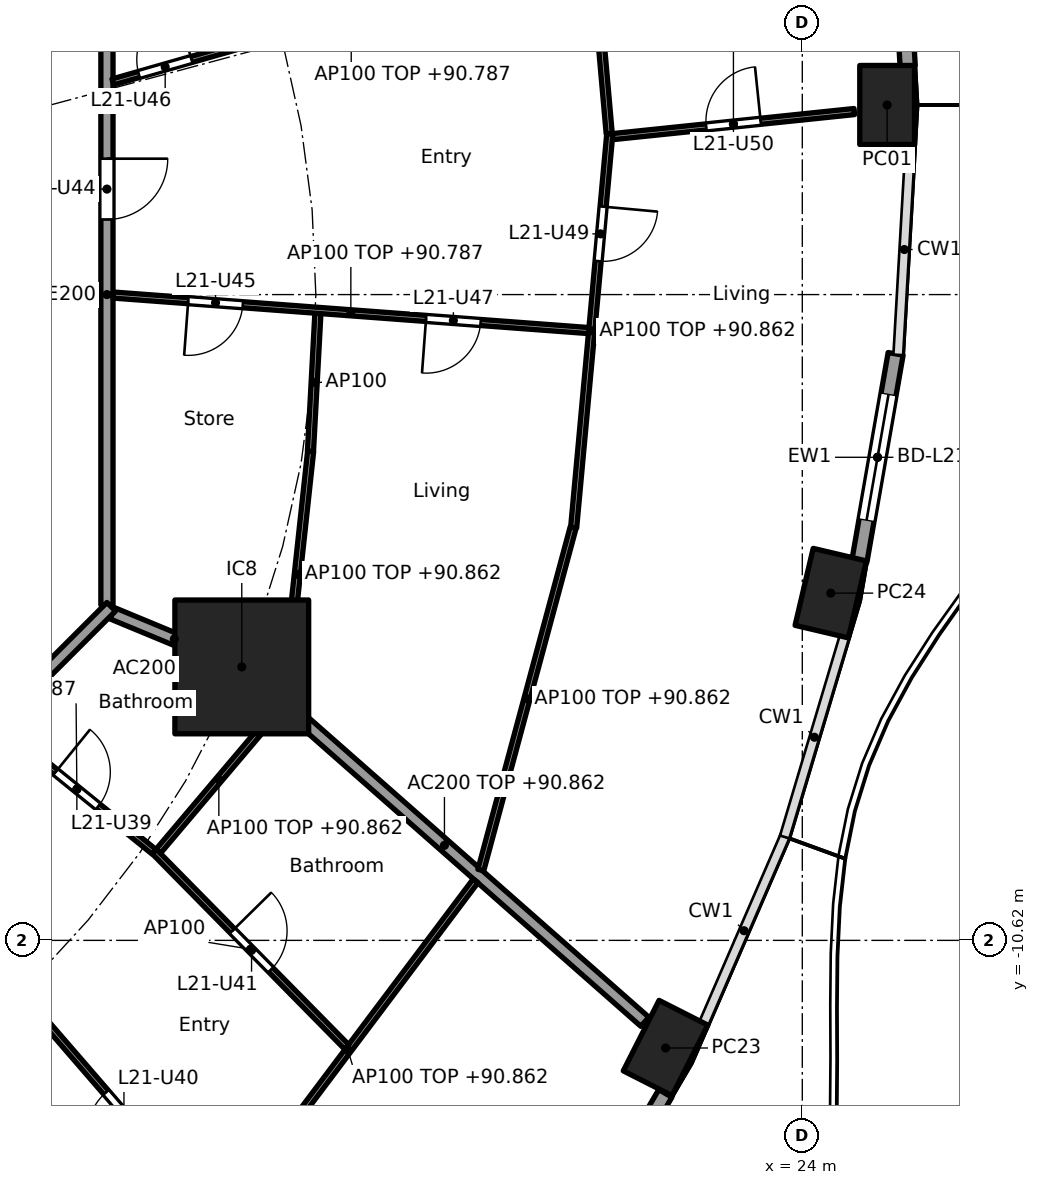
"""IFC4 building model, lengths in metres.
Left out: names, types, materials, properties, quantities, classifications, styles, units other than length and angle.
Written with IfcOpenShell. Run it as: python <this file> out.ifc"""

import sys

from ifc_helpers import new_model, si_unit, direction, frame, frame_2d, origin, origin_2d, place, context, subcontext, project, spatial, rectangle, hollow_rectangle, extrude, element, fill, save


model = new_model("IFC4")
c1 = context("Model", 3, precision=1e-05, world=origin(), true_north=direction((0.0, 1.0)))
c2 = subcontext(c1, "Body", "Model", "MODEL_VIEW")
j1 = project(units=[si_unit("LENGTHUNIT", "METRE"), si_unit("PLANEANGLEUNIT", "RADIAN")], contexts=[c1])
p1 = place(None, origin())
s1 = spatial("IfcSite", under=j1, at=p1, CompositionType="ELEMENT")
p2 = place(p1, origin())
s2 = spatial("IfcBuilding", under=s1, at=p2, CompositionType="ELEMENT")
p3 = place(p2, frame((0.0, 0.0, 88.1)))
s3 = spatial("IfcBuildingStorey", under=s2, at=p3, CompositionType="ELEMENT", Elevation=88.1)
for number, where, z_axis, x_axis in (
    (1, (25.395, 3.118, 0.0), (0.0, 0.0, 1.0), (0.0, 1.0, 0.0)),
    (2, (21.751, -12.39, 0.0), (0.0, 0.0, 1.0), (0.452, 0.892, 0.0)),
    (3, (24.468, -4.91, 0.0), (0.0, 0.0, 1.0), (0.229, 0.973, 0.0)),
):
    element("IfcColumn", number, at=place(p3, frame(where, z_axis=z_axis, x_axis=x_axis)), inside=s3, PredefinedType="COLUMN", context=c2, shape_type="SweptSolid", body=[
        extrude(hollow_rectangle(XDim=1.3, YDim=0.9, WallThickness=0.045, at=origin_2d()), origin(), (0.0, 0.0, 1.0), 3.7),
    ])
p4 = place(p3, frame((14.782, -6.123, 0.0), z_axis=(0.0, 0.0, 1.0), x_axis=(1.0, 0.0, 0.0)))
e4 = element("IfcColumn", 4, at=p4, inside=s3, PredefinedType="COLUMN", context=c2, shape_type="SweptSolid", body=[
    extrude(rectangle(XDim=2.2, YDim=2.2, at=origin_2d()), origin(), (0.0, 0.0, 1.0), 3.7),
])
p5 = place(p3, frame((25.533, 7.224, 0.0), z_axis=(0.0, 0.0, 1.0), x_axis=(0.057546644052, -0.998342818754, 0.0)))
e5 = element("IfcWall", 5, at=p5, inside=s3, PredefinedType="SOLIDWALL", context=c2, shape_type="SweptSolid", body=[
    extrude(rectangle(XDim=3.47, YDim=0.25, at=frame_2d((1.735, 0.0))), origin(), (0.0, 0.0, 1.0), 3.44),
])
p6 = place(p5, frame((0.685, 0.0, 0.0)))
e6 = element("IfcOpeningElement", 6, at=p6, cuts=e5, PredefinedType="OPENING", context=c2, shape_type="SweptSolid", body=[
    extrude(rectangle(XDim=2.1, YDim=2.4, at=frame_2d((1.05, 1.2))), frame((0.0, 0.135, 0.0), z_axis=(0.0, -1.0, 0.0), x_axis=(1.0, 0.0, 0.0)), (0.0, 0.0, 1.0), 0.27),
])
p7 = place(p3, frame((21.748, -13.137, 0.0), z_axis=(0.0, 0.0, 1.0), x_axis=(-0.506297921217, -0.862358634775, 0.0)))
e7 = element("IfcWall", 7, at=p7, inside=s3, PredefinedType="SOLIDWALL", context=c2, shape_type="SweptSolid", body=[
    extrude(rectangle(XDim=3.325, YDim=0.25, at=frame_2d((1.662, 0.0))), origin(), (0.0, 0.0, 1.0), 3.44),
])
p8 = place(p7, frame((0.612, 0.0, 0.0)))
e8 = element("IfcOpeningElement", 8, at=p8, cuts=e7, PredefinedType="OPENING", context=c2, shape_type="SweptSolid", body=[
    extrude(rectangle(XDim=2.1, YDim=2.4, at=frame_2d((1.05, 1.2))), frame((0.0, 0.135, 0.0), z_axis=(0.0, -1.0, 0.0), x_axis=(1.0, 0.0, 0.0)), (0.0, 0.0, 1.0), 0.27),
])
p9 = place(p3, frame((25.535, -0.974, 0.0), z_axis=(0.0, 0.0, 1.0), x_axis=(-0.172164316671, -0.985068245385, 0.0)))
e9 = element("IfcWall", 9, at=p9, inside=s3, PredefinedType="SOLIDWALL", context=c2, shape_type="SweptSolid", body=[
    extrude(rectangle(XDim=3.454, YDim=0.25, at=frame_2d((1.727, 0.0))), origin(), (0.0, 0.0, 1.0), 3.44),
])
p10 = place(p9, frame((0.677, 0.0, 0.0)))
e10 = element("IfcOpeningElement", 10, at=p10, cuts=e9, PredefinedType="OPENING", context=c2, shape_type="SweptSolid", body=[
    extrude(rectangle(XDim=2.1, YDim=2.4, at=frame_2d((1.05, 1.2))), frame((0.0, 0.135, 0.0), z_axis=(0.0, -1.0, 0.0), x_axis=(1.0, 0.0, 0.0)), (0.0, 0.0, 1.0), 0.27),
])
p11 = place(p3, frame((12.657, -5.243, 0.0), z_axis=(0.0, 0.0, 1.0), x_axis=(0.923876145736, -0.382691608661, 0.0)))
e11 = element("IfcWall", 11, at=p11, inside=s3, PredefinedType="PARTITIONING", context=c2, shape_type="SweptSolid", body=[
    extrude(rectangle(XDim=2.2, YDim=0.2, at=frame_2d((1.1, 0.0))), origin(), (0.0, 0.0, 1.0), 3.44),
])
p12 = place(p3, frame((14.82, -6.156, 0.0), z_axis=(0.0, 0.0, 1.0), x_axis=(0.750582231659, -0.660777052808, 0.0)))
e12 = element("IfcWall", 12, at=p12, inside=s3, PredefinedType="PARTITIONING", context=c2, shape_type="SweptSolid", body=[
    extrude(rectangle(XDim=8.781, YDim=0.2, at=frame_2d((4.391, 0.0))), origin(), (0.0, 0.0, 1.0), 2.762),
])
p13 = place(p3, frame((12.565, -5.104, 0.0), z_axis=(0.0, 0.0, 1.0), x_axis=(0.0, 1.0, 0.0)))
e13 = element("IfcWall", 13, at=p13, inside=s3, PredefinedType="PARTITIONING", context=c2, shape_type="SweptSolid", body=[
    extrude(rectangle(XDim=10.209, YDim=0.2, at=frame_2d((5.104, 0.0))), origin(), (0.0, 0.0, 1.0), 3.44),
])
p14 = place(p13, frame((6.339, 0.0, 0.0)))
e14 = element("IfcOpeningElement", 14, at=p14, cuts=e13, PredefinedType="OPENING", context=c2, shape_type="SweptSolid", body=[
    extrude(rectangle(XDim=1.0, YDim=2.1, at=frame_2d((0.5, 1.05))), frame((0.0, 0.11, 0.0), z_axis=(0.0, -1.0, 0.0), x_axis=(1.0, 0.0, 0.0)), (0.0, 0.0, 1.0), 0.22),
])
p15 = place(p3, frame((5.275, -12.494, 0.0), z_axis=(0.0, 0.0, 1.0), x_axis=(0.707106781187, 0.707106781187, 0.0)))
e15 = element("IfcWall", 15, at=p15, inside=s3, PredefinedType="PARTITIONING", context=c2, shape_type="SweptSolid", body=[
    extrude(rectangle(XDim=10.409, YDim=0.2, at=frame_2d((5.205, 0.0))), origin(), (0.0, 0.0, 1.0), 3.44),
])
p16 = place(p15, frame((5.906, 0.0, 0.0)))
e16 = element("IfcOpeningElement", 16, at=p16, cuts=e15, PredefinedType="OPENING", context=c2, shape_type="SweptSolid", body=[
    extrude(rectangle(XDim=1.0, YDim=2.1, at=frame_2d((0.5, 1.05))), frame((0.0, 0.11, 0.0), z_axis=(0.0, -1.0, 0.0), x_axis=(1.0, 0.0, 0.0)), (0.0, 0.0, 1.0), 0.22),
])
p17 = place(p3, frame((20.879, 2.597, 0.0), z_axis=(0.0, 0.0, 1.0), x_axis=(0.994666546694, 0.103142914868, 0.0)))
e17 = element("IfcWall", 17, at=p17, inside=s3, PredefinedType="PARTITIONING", context=c2, shape_type="SweptSolid", body=[
    extrude(rectangle(XDim=3.998, YDim=0.1, at=frame_2d((1.999, 0.0))), origin(), (0.0, 0.0, 1.0), 2.762),
])
p18 = place(p17, frame((1.549, 0.0, 0.0)))
e18 = element("IfcOpeningElement", 18, at=p18, cuts=e17, PredefinedType="OPENING", context=c2, shape_type="SweptSolid", body=[
    extrude(rectangle(XDim=0.9, YDim=2.1, at=frame_2d((0.45, 1.05))), frame((0.0, 0.06, 0.0), z_axis=(0.0, -1.0, 0.0), x_axis=(1.0, 0.0, 0.0)), (0.0, 0.0, 1.0), 0.12),
])
p19 = place(p3, frame((20.825, 2.642, 0.0), z_axis=(0.0, 0.0, 1.0), x_axis=(-0.08776129045, 0.99614153407, 0.0)))
e19 = element("IfcWall", 19, at=p19, inside=s3, PredefinedType="PARTITIONING", context=c2, shape_type="SweptSolid", body=[
    extrude(rectangle(XDim=6.237, YDim=0.1, at=frame_2d((3.119, 0.0))), origin(), (0.0, 0.0, 1.0), 2.762),
])
p20 = place(p3, frame((20.834, 2.642, 0.0), z_axis=(0.0, 0.0, 1.0), x_axis=(-0.091385407685, -0.995815599025, 0.0)))
e20 = element("IfcWall", 20, at=p20, inside=s3, PredefinedType="PARTITIONING", context=c2, shape_type="SweptSolid", body=[
    extrude(rectangle(XDim=6.502, YDim=0.1, at=frame_2d((3.251, 0.0))), origin(), (0.0, 0.0, 1.0), 2.762),
])
p21 = place(p20, frame((1.201, 0.0, 0.0)))
e21 = element("IfcOpeningElement", 21, at=p21, cuts=e20, PredefinedType="OPENING", context=c2, shape_type="SweptSolid", body=[
    extrude(rectangle(XDim=0.9, YDim=2.1, at=frame_2d((0.45, 1.05))), frame((0.0, 0.06, 0.0), z_axis=(0.0, -1.0, 0.0), x_axis=(1.0, 0.0, 0.0)), (0.0, 0.0, 1.0), 0.12),
])
p22 = place(p3, frame((12.661, 3.497, 0.0), z_axis=(0.0, 0.0, 1.0), x_axis=(0.961626678623, 0.274361314621, 0.0)))
e22 = element("IfcWall", 22, at=p22, inside=s3, PredefinedType="PARTITIONING", context=c2, shape_type="SweptSolid", body=[
    extrude(rectangle(XDim=8.156, YDim=0.1, at=frame_2d((4.078, 0.0))), origin(), (0.0, 0.0, 1.0), 2.687),
])
p23 = place(p22, frame((0.446, 0.0, 0.0)))
e23 = element("IfcOpeningElement", 23, at=p23, cuts=e22, PredefinedType="OPENING", context=c2, shape_type="SweptSolid", body=[
    extrude(rectangle(XDim=0.9, YDim=2.1, at=frame_2d((0.45, 1.05))), frame((0.0, 0.06, 0.0), z_axis=(0.0, -1.0, 0.0), x_axis=(1.0, 0.0, 0.0)), (0.0, 0.0, 1.0), 0.12),
])
p24 = place(p22, frame((5.39, 0.0, 0.0)))
e24 = element("IfcOpeningElement", 24, at=p24, cuts=e22, PredefinedType="OPENING", context=c2, shape_type="SweptSolid", body=[
    extrude(rectangle(XDim=0.9, YDim=2.1, at=frame_2d((0.45, 1.05))), frame((0.0, 0.06, 0.0), z_axis=(0.0, -1.0, 0.0), x_axis=(1.0, 0.0, 0.0)), (0.0, 0.0, 1.0), 0.12),
])
p25 = place(p3, frame((8.95, -8.96, 0.0), z_axis=(0.0, 0.0, 1.0), x_axis=(0.65441081073, -0.756139200676, 0.0)))
e25 = element("IfcWall", 25, at=p25, inside=s3, PredefinedType="PARTITIONING", context=c2, shape_type="SweptSolid", body=[
    extrude(rectangle(XDim=12.451, YDim=0.1, at=frame_2d((6.226, 0.0))), origin(), (0.0, 0.0, 1.0), 2.687),
])
p26 = place(p25, frame((1.336, 0.0, 0.0)))
e26 = element("IfcOpeningElement", 26, at=p26, cuts=e25, PredefinedType="OPENING", context=c2, shape_type="SweptSolid", body=[
    extrude(rectangle(XDim=0.9, YDim=2.1, at=frame_2d((0.45, 1.05))), frame((0.0, 0.06, 0.0), z_axis=(0.0, -1.0, 0.0), x_axis=(1.0, 0.0, 0.0)), (0.0, 0.0, 1.0), 0.12),
])
p27 = place(p25, frame((5.501, 0.0, 0.0)))
e27 = element("IfcOpeningElement", 27, at=p27, cuts=e25, PredefinedType="OPENING", context=c2, shape_type="SweptSolid", body=[
    extrude(rectangle(XDim=0.9, YDim=2.1, at=frame_2d((0.45, 1.05))), frame((0.0, 0.06, 0.0), z_axis=(0.0, -1.0, 0.0), x_axis=(1.0, 0.0, 0.0)), (0.0, 0.0, 1.0), 0.12),
])
p28 = place(p25, frame((9.941, 0.0, 0.0)))
e28 = element("IfcOpeningElement", 28, at=p28, cuts=e25, PredefinedType="OPENING", context=c2, shape_type="SweptSolid", body=[
    extrude(rectangle(XDim=0.9, YDim=2.1, at=frame_2d((0.45, 1.05))), frame((0.0, 0.06, 0.0), z_axis=(0.0, -1.0, 0.0), x_axis=(1.0, 0.0, 0.0)), (0.0, 0.0, 1.0), 0.12),
])
p29 = place(p3, frame((14.432, -15.219, 0.0), z_axis=(0.0, 0.0, 1.0), x_axis=(0.601001256685, 0.799248077548, 0.0)))
e29 = element("IfcWall", 29, at=p29, inside=s3, PredefinedType="PARTITIONING", context=c2, shape_type="SweptSolid", body=[
    extrude(rectangle(XDim=6.98, YDim=0.1, at=frame_2d((3.49, 0.0))), origin(), (0.0, 0.0, 1.0), 2.762),
])
p30 = place(p3, frame((10.802, -7.107, 0.0), z_axis=(0.0, 0.0, 1.0), x_axis=(0.776992142502, -0.62951029419, 0.0)))
e30 = element("IfcWall", 30, at=p30, inside=s3, PredefinedType="PARTITIONING", context=c2, shape_type="SweptSolid", body=[
    extrude(rectangle(XDim=3.263, YDim=0.1, at=frame_2d((1.631, 0.0))), origin(), (0.0, 0.0, 1.0), 2.687),
])
p31 = place(p30, frame((1.181, 0.0, 0.0)))
e31 = element("IfcOpeningElement", 31, at=p31, cuts=e30, PredefinedType="OPENING", context=c2, shape_type="SweptSolid", body=[
    extrude(rectangle(XDim=0.9, YDim=2.1, at=frame_2d((0.45, 1.05))), frame((0.0, 0.06, 0.0), z_axis=(0.0, -1.0, 0.0), x_axis=(1.0, 0.0, 0.0)), (0.0, 0.0, 1.0), 0.12),
])
p32 = place(p3, frame((13.341, -9.157, 0.0), z_axis=(0.0, 0.0, 1.0), x_axis=(0.701624526877, -0.712546856904, 0.0)))
e32 = element("IfcWall", 32, at=p32, inside=s3, PredefinedType="PARTITIONING", context=c2, shape_type="SweptSolid", body=[
    extrude(rectangle(XDim=4.515, YDim=0.1, at=frame_2d((2.258, 0.0))), origin(), (0.0, 0.0, 1.0), 3.44),
])
p33 = place(p32, frame((1.833, 0.0, 0.0)))
e33 = element("IfcOpeningElement", 33, at=p33, cuts=e32, PredefinedType="OPENING", context=c2, shape_type="SweptSolid", body=[
    extrude(rectangle(XDim=0.9, YDim=2.1, at=frame_2d((0.45, 1.05))), frame((0.0, 0.06, 0.0), z_axis=(0.0, -1.0, 0.0), x_axis=(1.0, 0.0, 0.0)), (0.0, 0.0, 1.0), 0.12),
])
p34 = place(p3, frame((13.409, -9.155, 0.0), z_axis=(0.0, 0.0, 1.0), x_axis=(0.646130325831, 0.763227097293, 0.0)))
e34 = element("IfcWall", 34, at=p34, inside=s3, PredefinedType="PARTITIONING", context=c2, shape_type="SweptSolid", body=[
    extrude(rectangle(XDim=3.084, YDim=0.1, at=frame_2d((1.542, 0.0))), origin(), (0.0, 0.0, 1.0), 2.762),
])
p35 = place(p3, frame((15.477, -6.625, 0.0), z_axis=(0.0, 0.0, 1.0), x_axis=(0.107561928907, 0.994198386365, 0.0)))
e35 = element("IfcWall", 35, at=p35, inside=s3, PredefinedType="PARTITIONING", context=c2, shape_type="SweptSolid", body=[
    extrude(rectangle(XDim=4.072, YDim=0.1, at=frame_2d((2.036, 0.0))), origin(), (0.0, 0.0, 1.0), 2.762),
])
p36 = place(p3, frame((18.713, -9.464, 0.0), z_axis=(0.0, 0.0, 1.0), x_axis=(0.260279646259, 0.965533275316, 0.0)))
e36 = element("IfcWall", 36, at=p36, inside=s3, PredefinedType="PARTITIONING", context=c2, shape_type="SweptSolid", body=[
    extrude(rectangle(XDim=5.833, YDim=0.1, at=frame_2d((2.917, 0.0))), origin(), (0.0, 0.0, 1.0), 2.762),
])
p37 = place(p3, frame((15.912, -2.577, 0.0), z_axis=(0.0, 0.0, 1.0), x_axis=(0.053749298185, 0.998554461682, 0.0)))
e37 = element("IfcWall", 37, at=p37, inside=s3, PredefinedType="PARTITIONING", context=c2, shape_type="SweptSolid", body=[
    extrude(rectangle(XDim=2.271, YDim=0.1, at=frame_2d((1.135, 0.0))), origin(), (0.0, 0.0, 1.0), 3.44),
])
p38 = place(p3, frame((12.665, -0.008, 0.0), z_axis=(0.0, 0.0, 1.0), x_axis=(0.997222647159, -0.074478130978, 0.0)))
e38 = element("IfcWall", 38, at=p38, inside=s3, PredefinedType="PARTITIONING", context=c2, shape_type="SweptSolid", body=[
    extrude(rectangle(XDim=7.844, YDim=0.1, at=frame_2d((3.922, 0.0))), origin(), (0.0, 0.0, 1.0), 2.687),
])
p39 = place(p38, frame((1.241, 0.0, 0.0)))
e39 = element("IfcOpeningElement", 39, at=p39, cuts=e38, PredefinedType="OPENING", context=c2, shape_type="SweptSolid", body=[
    extrude(rectangle(XDim=0.9, YDim=2.1, at=frame_2d((0.45, 1.05))), frame((0.0, 0.06, 0.0), z_axis=(0.0, -1.0, 0.0), x_axis=(1.0, 0.0, 0.0)), (0.0, 0.0, 1.0), 0.12),
])
p40 = place(p38, frame((5.163, 0.0, 0.0)))
e40 = element("IfcOpeningElement", 40, at=p40, cuts=e38, PredefinedType="OPENING", context=c2, shape_type="SweptSolid", body=[
    extrude(rectangle(XDim=0.9, YDim=2.1, at=frame_2d((0.45, 1.05))), frame((0.0, 0.06, 0.0), z_axis=(0.0, -1.0, 0.0), x_axis=(1.0, 0.0, 0.0)), (0.0, 0.0, 1.0), 0.12),
])
p41 = place(p10, origin())
e41 = element("IfcDoor", 41, at=p41, inside=s3, OperationType="SLIDING_TO_LEFT", PredefinedType="DOOR", context=c2, shape_type="SweptSolid", body=[
    extrude(rectangle(XDim=2.1, YDim=2.4, at=frame_2d((1.05, 1.2))), frame((0.0, 0.025, 0.0), z_axis=(0.0, -1.0, 0.0), x_axis=(1.0, 0.0, 0.0)), (0.0, 0.0, 1.0), 0.05),
])
fill(e10, e41)
p42 = place(p31, origin())
e42 = element("IfcDoor", 42, at=p42, inside=s3, OperationType="SINGLE_SWING_LEFT", PredefinedType="DOOR", context=c2, shape_type="SweptSolid", body=[
    extrude(rectangle(XDim=0.9, YDim=2.1, at=frame_2d((0.45, 1.05))), frame((0.0, 0.025, 0.0), z_axis=(0.0, -1.0, 0.0), x_axis=(1.0, 0.0, 0.0)), (0.0, 0.0, 1.0), 0.05),
])
fill(e31, e42)
p43 = place(p27, frame((0.9, 0.0, 0.0), x_axis=(-1.0, 0.0, 0.0)))
e43 = element("IfcDoor", 43, at=p43, inside=s3, OperationType="SINGLE_SWING_LEFT", PredefinedType="DOOR", context=c2, shape_type="SweptSolid", body=[
    extrude(rectangle(XDim=0.9, YDim=2.1, at=frame_2d((0.45, 1.05))), frame((0.0, 0.025, 0.0), z_axis=(0.0, -1.0, 0.0), x_axis=(1.0, 0.0, 0.0)), (0.0, 0.0, 1.0), 0.05),
])
fill(e27, e43)
p44 = place(p33, origin())
e44 = element("IfcDoor", 44, at=p44, inside=s3, OperationType="SINGLE_SWING_LEFT", PredefinedType="DOOR", context=c2, shape_type="SweptSolid", body=[
    extrude(rectangle(XDim=0.9, YDim=2.1, at=frame_2d((0.45, 1.05))), frame((0.0, 0.025, 0.0), z_axis=(0.0, -1.0, 0.0), x_axis=(1.0, 0.0, 0.0)), (0.0, 0.0, 1.0), 0.05),
])
fill(e33, e44)
p45 = place(p14, frame((1.0, 0.0, 0.0), x_axis=(-1.0, 0.0, 0.0)))
e45 = element("IfcDoor", 45, at=p45, inside=s3, OperationType="SINGLE_SWING_LEFT", PredefinedType="DOOR", context=c2, shape_type="SweptSolid", body=[
    extrude(rectangle(XDim=1.0, YDim=2.1, at=frame_2d((0.5, 1.05))), frame((0.0, 0.025, 0.0), z_axis=(0.0, -1.0, 0.0), x_axis=(1.0, 0.0, 0.0)), (0.0, 0.0, 1.0), 0.05),
])
fill(e14, e45)
p46 = place(p39, frame((0.9, 0.0, 0.0), x_axis=(-1.0, 0.0, 0.0)))
e46 = element("IfcDoor", 46, at=p46, inside=s3, OperationType="SINGLE_SWING_RIGHT", PredefinedType="DOOR", context=c2, shape_type="SweptSolid", body=[
    extrude(rectangle(XDim=0.9, YDim=2.1, at=frame_2d((0.45, 1.05))), frame((0.0, 0.025, 0.0), z_axis=(0.0, -1.0, 0.0), x_axis=(1.0, 0.0, 0.0)), (0.0, 0.0, 1.0), 0.05),
])
fill(e39, e46)
p47 = place(p23, origin())
e47 = element("IfcDoor", 47, at=p47, inside=s3, OperationType="SINGLE_SWING_RIGHT", PredefinedType="DOOR", context=c2, shape_type="SweptSolid", body=[
    extrude(rectangle(XDim=0.9, YDim=2.1, at=frame_2d((0.45, 1.05))), frame((0.0, 0.025, 0.0), z_axis=(0.0, -1.0, 0.0), x_axis=(1.0, 0.0, 0.0)), (0.0, 0.0, 1.0), 0.05),
])
fill(e23, e47)
p48 = place(p40, frame((0.9, 0.0, 0.0), x_axis=(-1.0, 0.0, 0.0)))
e48 = element("IfcDoor", 48, at=p48, inside=s3, OperationType="SINGLE_SWING_RIGHT", PredefinedType="DOOR", context=c2, shape_type="SweptSolid", body=[
    extrude(rectangle(XDim=0.9, YDim=2.1, at=frame_2d((0.45, 1.05))), frame((0.0, 0.025, 0.0), z_axis=(0.0, -1.0, 0.0), x_axis=(1.0, 0.0, 0.0)), (0.0, 0.0, 1.0), 0.05),
])
fill(e40, e48)
p49 = place(p21, origin())
e49 = element("IfcDoor", 49, at=p49, inside=s3, OperationType="SINGLE_SWING_LEFT", PredefinedType="DOOR", context=c2, shape_type="SweptSolid", body=[
    extrude(rectangle(XDim=0.9, YDim=2.1, at=frame_2d((0.45, 1.05))), frame((0.0, 0.025, 0.0), z_axis=(0.0, -1.0, 0.0), x_axis=(1.0, 0.0, 0.0)), (0.0, 0.0, 1.0), 0.05),
])
fill(e21, e49)
p50 = place(p18, origin())
e50 = element("IfcDoor", 50, at=p50, inside=s3, OperationType="SINGLE_SWING_RIGHT", PredefinedType="DOOR", context=c2, shape_type="SweptSolid", body=[
    extrude(rectangle(XDim=0.9, YDim=2.1, at=frame_2d((0.45, 1.05))), frame((0.0, 0.025, 0.0), z_axis=(0.0, -1.0, 0.0), x_axis=(1.0, 0.0, 0.0)), (0.0, 0.0, 1.0), 0.05),
])
fill(e18, e50)
save(model, sys.argv[1])
